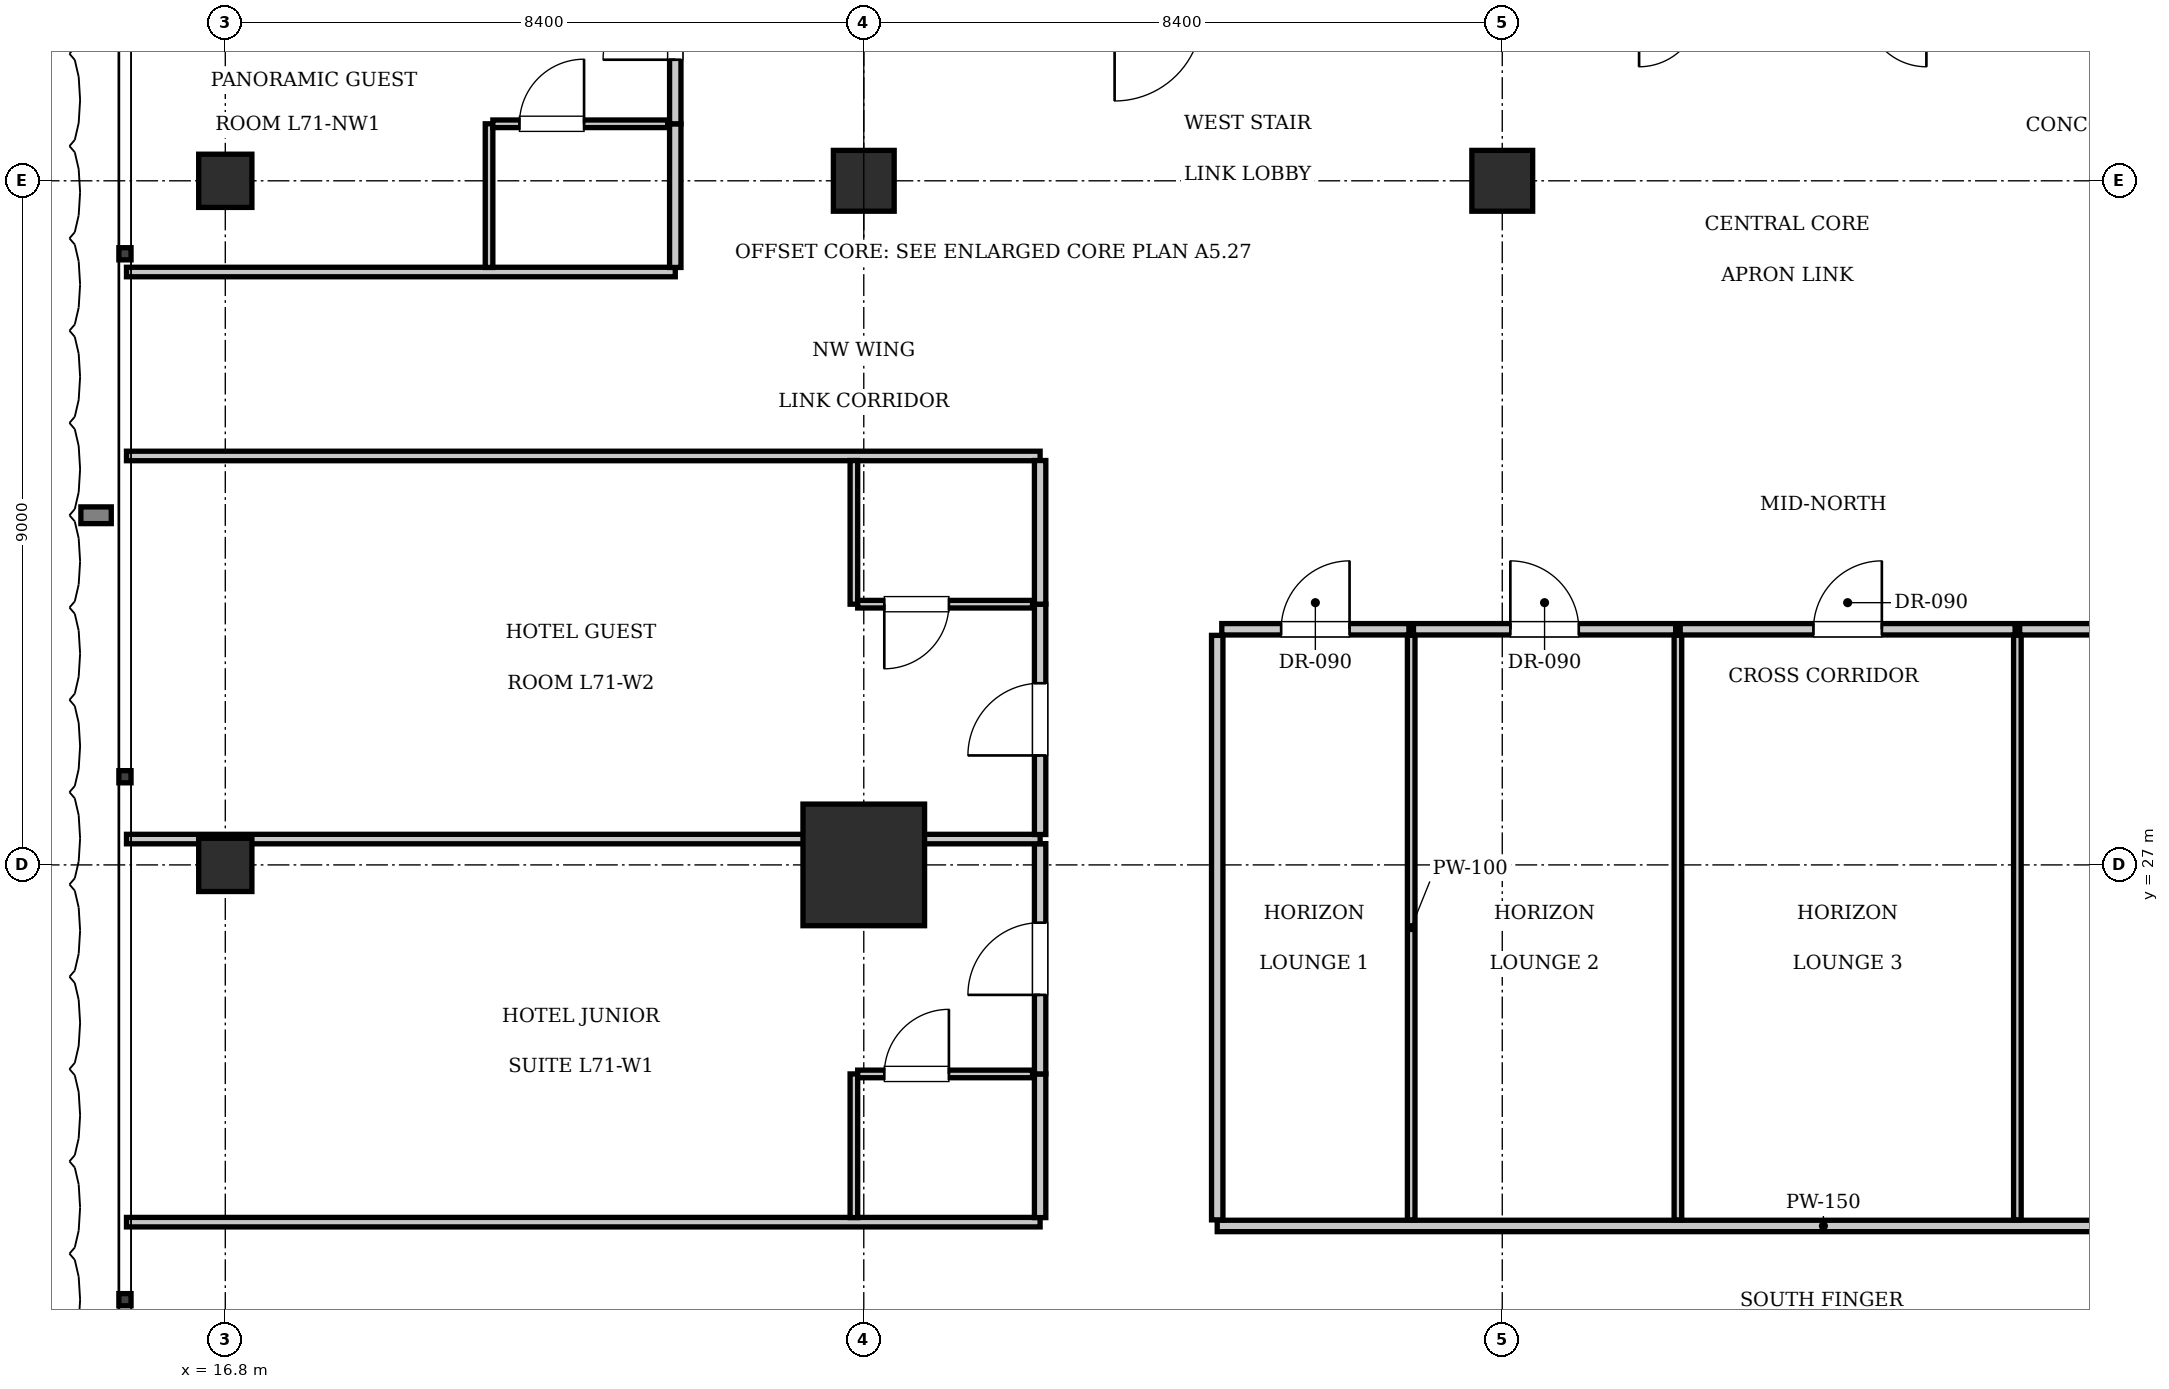
"""IFC4 building model, lengths in metres.
Left out: names, types, materials, properties, quantities, classifications, styles, units other than length and angle.
Written with IfcOpenShell. Run it as: python <this file> out.ifc"""

import sys

from ifc_helpers import new_model, si_unit, direction, frame, frame_2d, origin, origin_2d, place, context, subcontext, project, spatial, rectangle, extrude, element, fill, save


model = new_model("IFC4")
c1 = context("Model", 3, precision=1e-05, world=origin(), true_north=direction((0.0, 1.0)))
c2 = subcontext(c1, "Body", "Model", "MODEL_VIEW")
j1 = project(units=[si_unit("LENGTHUNIT", "METRE"), si_unit("PLANEANGLEUNIT", "RADIAN")], contexts=[c1])
p1 = place(None, origin())
s1 = spatial("IfcSite", under=j1, at=p1, CompositionType="ELEMENT")
p2 = place(p1, origin())
s2 = spatial("IfcBuilding", under=s1, at=p2, CompositionType="ELEMENT")
p3 = place(p2, frame((0.0, 0.0, 289.45)))
s3 = spatial("IfcBuildingStorey", under=s2, at=p3, CompositionType="ELEMENT", Elevation=289.45)
p4 = place(p3, frame((25.2, 27.0, 0.0), z_axis=(0.0, 0.0, 1.0), x_axis=(1.0, 0.0, 0.0)))
e1 = element("IfcColumn", 1, at=p4, inside=s3, PredefinedType="COLUMN", context=c2, shape_type="SweptSolid", body=[
    extrude(rectangle(XDim=1.6, YDim=1.6, at=origin_2d()), origin(), (0.0, 0.0, 1.0), 3.85),
])
for number, where, z_axis, x_axis in (
    (2, (25.2, 36.0, 0.0), (0.0, 0.0, 1.0), (1.0, 0.0, 0.0)),
    (3, (33.6, 36.0, 0.0), (0.0, 0.0, 1.0), (1.0, 0.0, 0.0)),
):
    element("IfcColumn", number, at=place(p3, frame(where, z_axis=z_axis, x_axis=x_axis)), inside=s3, PredefinedType="COLUMN", context=c2, shape_type="SweptSolid", body=[
        extrude(rectangle(XDim=0.8, YDim=0.8, at=origin_2d()), origin(), (0.0, 0.0, 1.0), 3.85),
    ])
for number, where, z_axis, x_axis in (
    (4, (16.8, 27.0, 0.0), (0.0, 0.0, 1.0), (1.0, 0.0, 0.0)),
    (5, (16.8, 36.0, 0.0), (0.0, 0.0, 1.0), (1.0, 0.0, 0.0)),
):
    element("IfcColumn", number, at=place(p3, frame(where, z_axis=z_axis, x_axis=x_axis)), inside=s3, PredefinedType="COLUMN", context=c2, shape_type="SweptSolid", body=[
        extrude(rectangle(XDim=0.7, YDim=0.7, at=origin_2d()), origin(), (0.0, 0.0, 1.0), 3.85),
    ])
p5 = place(p3, frame((29.85, 22.25, 0.0), z_axis=(0.0, 0.0, 1.0), x_axis=(1.0, 0.0, 0.0)))
e6 = element("IfcWall", 6, at=p5, inside=s3, PredefinedType="PARTITIONING", context=c2, shape_type="SweptSolid", body=[
    extrude(rectangle(XDim=15.95, YDim=0.15, at=frame_2d((7.975, 0.0))), origin(), (0.0, 0.0, 1.0), 3.61),
])
p6 = place(p3, frame((29.85, 22.33, 0.0), z_axis=(0.0, 0.0, 1.0), x_axis=(0.0, 1.0, 0.0)))
e7 = element("IfcWall", 7, at=p6, inside=s3, PredefinedType="PARTITIONING", context=c2, shape_type="SweptSolid", body=[
    extrude(rectangle(XDim=7.69, YDim=0.15, at=frame_2d((3.845, 0.0))), origin(), (0.0, 0.0, 1.0), 3.61),
])
p7 = place(p3, frame((29.91, 30.1, 0.0), z_axis=(0.0, 0.0, 1.0), x_axis=(1.0, 0.0, 0.0)))
e8 = element("IfcWall", 8, at=p7, inside=s3, PredefinedType="PARTITIONING", context=c2, shape_type="SweptSolid", body=[
    extrude(rectangle(XDim=2.462, YDim=0.15, at=frame_2d((1.231, 0.0))), origin(), (0.0, 0.0, 1.0), 3.61),
])
p8 = place(p7, frame((0.781, 0.0, 0.0)))
e9 = element("IfcOpeningElement", 9, at=p8, cuts=e8, PredefinedType="OPENING", context=c2, shape_type="SweptSolid", body=[
    extrude(rectangle(XDim=0.9, YDim=2.1, at=frame_2d((0.45, 1.05))), frame((0.0, 0.085, 0.0), z_axis=(0.0, -1.0, 0.0), x_axis=(1.0, 0.0, 0.0)), (0.0, 0.0, 1.0), 0.17),
])
p9 = place(p3, frame((32.402, 22.33, 0.0), z_axis=(0.0, 0.0, 1.0), x_axis=(0.0, 1.0, 0.0)))
e10 = element("IfcWall", 10, at=p9, inside=s3, PredefinedType="PARTITIONING", context=c2, shape_type="SweptSolid", body=[
    extrude(rectangle(XDim=7.69, YDim=0.1, at=frame_2d((3.845, 0.0))), origin(), (0.0, 0.0, 1.0), 3.61),
])
p10 = place(p3, frame((32.432, 30.1, 0.0), z_axis=(0.0, 0.0, 1.0), x_axis=(1.0, 0.0, 0.0)))
e11 = element("IfcWall", 11, at=p10, inside=s3, PredefinedType="PARTITIONING", context=c2, shape_type="SweptSolid", body=[
    extrude(rectangle(XDim=3.449, YDim=0.15, at=frame_2d((1.725, 0.0))), origin(), (0.0, 0.0, 1.0), 3.61),
])
p11 = place(p10, frame((1.274, 0.0, 0.0)))
e12 = element("IfcOpeningElement", 12, at=p11, cuts=e11, PredefinedType="OPENING", context=c2, shape_type="SweptSolid", body=[
    extrude(rectangle(XDim=0.9, YDim=2.1, at=frame_2d((0.45, 1.05))), frame((0.0, 0.085, 0.0), z_axis=(0.0, -1.0, 0.0), x_axis=(1.0, 0.0, 0.0)), (0.0, 0.0, 1.0), 0.17),
])
p12 = place(p3, frame((35.911, 22.33, 0.0), z_axis=(0.0, 0.0, 1.0), x_axis=(0.0, 1.0, 0.0)))
e13 = element("IfcWall", 13, at=p12, inside=s3, PredefinedType="PARTITIONING", context=c2, shape_type="SweptSolid", body=[
    extrude(rectangle(XDim=7.69, YDim=0.1, at=frame_2d((3.845, 0.0))), origin(), (0.0, 0.0, 1.0), 3.61),
])
p13 = place(p3, frame((35.941, 30.1, 0.0), z_axis=(0.0, 0.0, 1.0), x_axis=(1.0, 0.0, 0.0)))
e14 = element("IfcWall", 14, at=p13, inside=s3, PredefinedType="PARTITIONING", context=c2, shape_type="SweptSolid", body=[
    extrude(rectangle(XDim=4.406, YDim=0.15, at=frame_2d((2.203, 0.0))), origin(), (0.0, 0.0, 1.0), 3.61),
])
p14 = place(p13, frame((1.753, 0.0, 0.0)))
e15 = element("IfcOpeningElement", 15, at=p14, cuts=e14, PredefinedType="OPENING", context=c2, shape_type="SweptSolid", body=[
    extrude(rectangle(XDim=0.9, YDim=2.1, at=frame_2d((0.45, 1.05))), frame((0.0, 0.085, 0.0), z_axis=(0.0, -1.0, 0.0), x_axis=(1.0, 0.0, 0.0)), (0.0, 0.0, 1.0), 0.17),
])
p15 = place(p3, frame((40.377, 22.33, 0.0), z_axis=(0.0, 0.0, 1.0), x_axis=(0.0, 1.0, 0.0)))
e16 = element("IfcWall", 16, at=p15, inside=s3, PredefinedType="PARTITIONING", context=c2, shape_type="SweptSolid", body=[
    extrude(rectangle(XDim=7.69, YDim=0.1, at=frame_2d((3.845, 0.0))), origin(), (0.0, 0.0, 1.0), 3.61),
])
p16 = place(p3, frame((40.407, 30.1, 0.0), z_axis=(0.0, 0.0, 1.0), x_axis=(1.0, 0.0, 0.0)))
e17 = element("IfcWall", 17, at=p16, inside=s3, PredefinedType="PARTITIONING", context=c2, shape_type="SweptSolid", body=[
    extrude(rectangle(XDim=5.333, YDim=0.15, at=frame_2d((2.667, 0.0))), origin(), (0.0, 0.0, 1.0), 3.61),
])
p17 = place(p16, frame((2.217, 0.0, 0.0)))
e18 = element("IfcOpeningElement", 18, at=p17, cuts=e17, PredefinedType="OPENING", context=c2, shape_type="SweptSolid", body=[
    extrude(rectangle(XDim=0.9, YDim=2.1, at=frame_2d((0.45, 1.05))), frame((0.0, 0.085, 0.0), z_axis=(0.0, -1.0, 0.0), x_axis=(1.0, 0.0, 0.0)), (0.0, 0.0, 1.0), 0.17),
])
for number, where, z_axis, x_axis in (
    (19, (15.5, 22.3, 0.0), (0.0, 0.0, 1.0), (1.0, 0.0, 0.0)),
    (20, (15.5, 32.38, 0.0), (0.0, 0.0, 1.0), (1.0, 0.0, 0.0)),
):
    element("IfcWall", number, at=place(p3, frame(where, z_axis=z_axis, x_axis=x_axis)), inside=s3, PredefinedType="PARTITIONING", context=c2, shape_type="SweptSolid", body=[
        extrude(rectangle(XDim=12.02, YDim=0.125, at=frame_2d((6.01, 0.0))), origin(), (0.0, 0.0, 1.0), 3.61),
    ])
p18 = place(p3, frame((27.52, 22.36, 0.0), z_axis=(0.0, 0.0, 1.0), x_axis=(0.0, 1.0, 0.0)))
e21 = element("IfcWall", 21, at=p18, inside=s3, PredefinedType="PARTITIONING", context=c2, shape_type="SweptSolid", body=[
    extrude(rectangle(XDim=1.89, YDim=0.15, at=frame_2d((0.945, 0.0))), origin(), (0.0, 0.0, 1.0), 3.61),
])
p19 = place(p3, frame((27.52, 24.25, 0.0), z_axis=(0.0, 0.0, 1.0), x_axis=(0.0, 1.0, 0.0)))
e22 = element("IfcWall", 22, at=p19, inside=s3, PredefinedType="PARTITIONING", context=c2, shape_type="SweptSolid", body=[
    extrude(rectangle(XDim=3.03, YDim=0.15, at=frame_2d((1.515, 0.0))), origin(), (0.0, 0.0, 1.0), 3.61),
])
p20 = place(p19, frame((1.04, 0.0, 0.0)))
e23 = element("IfcOpeningElement", 23, at=p20, cuts=e22, PredefinedType="OPENING", context=c2, shape_type="SweptSolid", body=[
    extrude(rectangle(XDim=0.95, YDim=2.15, at=frame_2d((0.475, 1.075))), frame((0.0, 0.085, 0.0), z_axis=(0.0, -1.0, 0.0), x_axis=(1.0, 0.0, 0.0)), (0.0, 0.0, 1.0), 0.17),
])
p21 = place(p3, frame((25.07, 22.36, 0.0), z_axis=(0.0, 0.0, 1.0), x_axis=(0.0, 1.0, 0.0)))
e24 = element("IfcWall", 24, at=p21, inside=s3, PredefinedType="PARTITIONING", context=c2, shape_type="SweptSolid", body=[
    extrude(rectangle(XDim=1.89, YDim=0.1, at=frame_2d((0.945, 0.0))), origin(), (0.0, 0.0, 1.0), 3.61),
])
p22 = place(p3, frame((25.12, 24.25, 0.0), z_axis=(0.0, 0.0, 1.0), x_axis=(1.0, 0.0, 0.0)))
e25 = element("IfcWall", 25, at=p22, inside=s3, PredefinedType="PARTITIONING", context=c2, shape_type="SweptSolid", body=[
    extrude(rectangle(XDim=2.3, YDim=0.1, at=frame_2d((1.15, 0.0))), origin(), (0.0, 0.0, 1.0), 3.61),
])
p23 = place(p22, frame((0.35, 0.0, 0.0)))
e26 = element("IfcOpeningElement", 26, at=p23, cuts=e25, PredefinedType="OPENING", context=c2, shape_type="SweptSolid", body=[
    extrude(rectangle(XDim=0.85, YDim=2.1, at=frame_2d((0.425, 1.05))), frame((0.0, 0.06, 0.0), z_axis=(0.0, -1.0, 0.0), x_axis=(1.0, 0.0, 0.0)), (0.0, 0.0, 1.0), 0.12),
])
p24 = place(p3, frame((15.5, 27.34, 0.0), z_axis=(0.0, 0.0, 1.0), x_axis=(1.0, 0.0, 0.0)))
e27 = element("IfcWall", 27, at=p24, inside=s3, PredefinedType="PARTITIONING", context=c2, shape_type="SweptSolid", body=[
    extrude(rectangle(XDim=12.02, YDim=0.125, at=frame_2d((6.01, 0.0))), origin(), (0.0, 0.0, 1.0), 3.61),
])
p25 = place(p3, frame((27.52, 27.4, 0.0), z_axis=(0.0, 0.0, 1.0), x_axis=(0.0, 1.0, 0.0)))
e28 = element("IfcWall", 28, at=p25, inside=s3, PredefinedType="PARTITIONING", context=c2, shape_type="SweptSolid", body=[
    extrude(rectangle(XDim=3.03, YDim=0.15, at=frame_2d((1.515, 0.0))), origin(), (0.0, 0.0, 1.0), 3.61),
])
p26 = place(p25, frame((1.04, 0.0, 0.0)))
e29 = element("IfcOpeningElement", 29, at=p26, cuts=e28, PredefinedType="OPENING", context=c2, shape_type="SweptSolid", body=[
    extrude(rectangle(XDim=0.95, YDim=2.15, at=frame_2d((0.475, 1.075))), frame((0.0, 0.085, 0.0), z_axis=(0.0, -1.0, 0.0), x_axis=(1.0, 0.0, 0.0)), (0.0, 0.0, 1.0), 0.17),
])
p27 = place(p3, frame((27.52, 30.43, 0.0), z_axis=(0.0, 0.0, 1.0), x_axis=(0.0, 1.0, 0.0)))
e30 = element("IfcWall", 30, at=p27, inside=s3, PredefinedType="PARTITIONING", context=c2, shape_type="SweptSolid", body=[
    extrude(rectangle(XDim=1.89, YDim=0.15, at=frame_2d((0.945, 0.0))), origin(), (0.0, 0.0, 1.0), 3.61),
])
p28 = place(p3, frame((25.07, 30.43, 0.0), z_axis=(0.0, 0.0, 1.0), x_axis=(0.0, 1.0, 0.0)))
e31 = element("IfcWall", 31, at=p28, inside=s3, PredefinedType="PARTITIONING", context=c2, shape_type="SweptSolid", body=[
    extrude(rectangle(XDim=1.89, YDim=0.1, at=frame_2d((0.945, 0.0))), origin(), (0.0, 0.0, 1.0), 3.61),
])
p29 = place(p3, frame((25.12, 30.43, 0.0), z_axis=(0.0, 0.0, 1.0), x_axis=(1.0, 0.0, 0.0)))
e32 = element("IfcWall", 32, at=p29, inside=s3, PredefinedType="PARTITIONING", context=c2, shape_type="SweptSolid", body=[
    extrude(rectangle(XDim=2.3, YDim=0.1, at=frame_2d((1.15, 0.0))), origin(), (0.0, 0.0, 1.0), 3.61),
])
p30 = place(p29, frame((0.35, 0.0, 0.0)))
e33 = element("IfcOpeningElement", 33, at=p30, cuts=e32, PredefinedType="OPENING", context=c2, shape_type="SweptSolid", body=[
    extrude(rectangle(XDim=0.85, YDim=2.1, at=frame_2d((0.425, 1.05))), frame((0.0, 0.06, 0.0), z_axis=(0.0, -1.0, 0.0), x_axis=(1.0, 0.0, 0.0)), (0.0, 0.0, 1.0), 0.12),
])
p31 = place(p3, frame((15.5, 34.8, 0.0), z_axis=(0.0, 0.0, 1.0), x_axis=(1.0, 0.0, 0.0)))
e34 = element("IfcWall", 34, at=p31, inside=s3, PredefinedType="PARTITIONING", context=c2, shape_type="SweptSolid", body=[
    extrude(rectangle(XDim=7.22, YDim=0.125, at=frame_2d((3.61, 0.0))), origin(), (0.0, 0.0, 1.0), 3.61),
])
p32 = place(p3, frame((22.72, 34.86, 0.0), z_axis=(0.0, 0.0, 1.0), x_axis=(0.0, 1.0, 0.0)))
e35 = element("IfcWall", 35, at=p32, inside=s3, PredefinedType="PARTITIONING", context=c2, shape_type="SweptSolid", body=[
    extrude(rectangle(XDim=1.89, YDim=0.15, at=frame_2d((0.945, 0.0))), origin(), (0.0, 0.0, 1.0), 3.61),
])
p33 = place(p3, frame((22.72, 36.75, 0.0), z_axis=(0.0, 0.0, 1.0), x_axis=(0.0, 1.0, 0.0)))
e36 = element("IfcWall", 36, at=p33, inside=s3, PredefinedType="PARTITIONING", context=c2, shape_type="SweptSolid", body=[
    extrude(rectangle(XDim=2.636, YDim=0.15, at=frame_2d((1.318, 0.0))), origin(), (0.0, 0.0, 1.0), 3.61),
])
p34 = place(p33, frame((0.843, 0.0, 0.0)))
e37 = element("IfcOpeningElement", 37, at=p34, cuts=e36, PredefinedType="OPENING", context=c2, shape_type="SweptSolid", body=[
    extrude(rectangle(XDim=0.95, YDim=2.15, at=frame_2d((0.475, 1.075))), frame((0.0, 0.085, 0.0), z_axis=(0.0, -1.0, 0.0), x_axis=(1.0, 0.0, 0.0)), (0.0, 0.0, 1.0), 0.17),
])
p35 = place(p3, frame((20.27, 34.86, 0.0), z_axis=(0.0, 0.0, 1.0), x_axis=(0.0, 1.0, 0.0)))
e38 = element("IfcWall", 38, at=p35, inside=s3, PredefinedType="PARTITIONING", context=c2, shape_type="SweptSolid", body=[
    extrude(rectangle(XDim=1.89, YDim=0.1, at=frame_2d((0.945, 0.0))), origin(), (0.0, 0.0, 1.0), 3.61),
])
p36 = place(p3, frame((20.32, 36.75, 0.0), z_axis=(0.0, 0.0, 1.0), x_axis=(1.0, 0.0, 0.0)))
e39 = element("IfcWall", 39, at=p36, inside=s3, PredefinedType="PARTITIONING", context=c2, shape_type="SweptSolid", body=[
    extrude(rectangle(XDim=2.3, YDim=0.1, at=frame_2d((1.15, 0.0))), origin(), (0.0, 0.0, 1.0), 3.61),
])
p37 = place(p36, frame((0.35, 0.0, 0.0)))
e40 = element("IfcOpeningElement", 40, at=p37, cuts=e39, PredefinedType="OPENING", context=c2, shape_type="SweptSolid", body=[
    extrude(rectangle(XDim=0.85, YDim=2.1, at=frame_2d((0.425, 1.05))), frame((0.0, 0.06, 0.0), z_axis=(0.0, -1.0, 0.0), x_axis=(1.0, 0.0, 0.0)), (0.0, 0.0, 1.0), 0.12),
])
p38 = place(p8, origin())
e41 = element("IfcDoor", 41, at=p38, inside=s3, OperationType="SINGLE_SWING_RIGHT", PredefinedType="DOOR", context=c2, shape_type="SweptSolid", body=[
    extrude(rectangle(XDim=0.9, YDim=2.1, at=frame_2d((0.45, 1.05))), frame((0.0, 0.025, 0.0), z_axis=(0.0, -1.0, 0.0), x_axis=(1.0, 0.0, 0.0)), (0.0, 0.0, 1.0), 0.05),
])
fill(e9, e41)
p39 = place(p11, origin())
e42 = element("IfcDoor", 42, at=p39, inside=s3, OperationType="SINGLE_SWING_LEFT", PredefinedType="DOOR", context=c2, shape_type="SweptSolid", body=[
    extrude(rectangle(XDim=0.9, YDim=2.1, at=frame_2d((0.45, 1.05))), frame((0.0, 0.025, 0.0), z_axis=(0.0, -1.0, 0.0), x_axis=(1.0, 0.0, 0.0)), (0.0, 0.0, 1.0), 0.05),
])
fill(e12, e42)
p40 = place(p14, origin())
e43 = element("IfcDoor", 43, at=p40, inside=s3, OperationType="SINGLE_SWING_RIGHT", PredefinedType="DOOR", context=c2, shape_type="SweptSolid", body=[
    extrude(rectangle(XDim=0.9, YDim=2.1, at=frame_2d((0.45, 1.05))), frame((0.0, 0.025, 0.0), z_axis=(0.0, -1.0, 0.0), x_axis=(1.0, 0.0, 0.0)), (0.0, 0.0, 1.0), 0.05),
])
fill(e15, e43)
p41 = place(p23, origin())
e44 = element("IfcDoor", 44, at=p41, inside=s3, OperationType="SINGLE_SWING_RIGHT", PredefinedType="DOOR", context=c2, shape_type="SweptSolid", body=[
    extrude(rectangle(XDim=0.85, YDim=2.1, at=frame_2d((0.425, 1.05))), frame((0.0, 0.025, 0.0), z_axis=(0.0, -1.0, 0.0), x_axis=(1.0, 0.0, 0.0)), (0.0, 0.0, 1.0), 0.05),
])
fill(e26, e44)
p42 = place(p20, origin())
e45 = element("IfcDoor", 45, at=p42, inside=s3, OperationType="SINGLE_SWING_LEFT", PredefinedType="DOOR", context=c2, shape_type="SweptSolid", body=[
    extrude(rectangle(XDim=0.95, YDim=2.15, at=frame_2d((0.475, 1.075))), frame((0.0, 0.025, 0.0), z_axis=(0.0, -1.0, 0.0), x_axis=(1.0, 0.0, 0.0)), (0.0, 0.0, 1.0), 0.05),
])
fill(e23, e45)
p43 = place(p30, frame((0.85, 0.0, 0.0), z_axis=(0.0, 0.0, 1.0), x_axis=(-1.0, 0.0, 0.0)))
e46 = element("IfcDoor", 46, at=p43, inside=s3, OperationType="SINGLE_SWING_RIGHT", PredefinedType="DOOR", context=c2, shape_type="SweptSolid", body=[
    extrude(rectangle(XDim=0.85, YDim=2.1, at=frame_2d((0.425, 1.05))), frame((0.0, 0.025, 0.0), z_axis=(0.0, -1.0, 0.0), x_axis=(1.0, 0.0, 0.0)), (0.0, 0.0, 1.0), 0.05),
])
fill(e33, e46)
p44 = place(p26, origin())
e47 = element("IfcDoor", 47, at=p44, inside=s3, OperationType="SINGLE_SWING_LEFT", PredefinedType="DOOR", context=c2, shape_type="SweptSolid", body=[
    extrude(rectangle(XDim=0.95, YDim=2.15, at=frame_2d((0.475, 1.075))), frame((0.0, 0.025, 0.0), z_axis=(0.0, -1.0, 0.0), x_axis=(1.0, 0.0, 0.0)), (0.0, 0.0, 1.0), 0.05),
])
fill(e29, e47)
p45 = place(p37, origin())
e48 = element("IfcDoor", 48, at=p45, inside=s3, OperationType="SINGLE_SWING_RIGHT", PredefinedType="DOOR", context=c2, shape_type="SweptSolid", body=[
    extrude(rectangle(XDim=0.85, YDim=2.1, at=frame_2d((0.425, 1.05))), frame((0.0, 0.025, 0.0), z_axis=(0.0, -1.0, 0.0), x_axis=(1.0, 0.0, 0.0)), (0.0, 0.0, 1.0), 0.05),
])
fill(e40, e48)
p46 = place(p34, origin())
e49 = element("IfcDoor", 49, at=p46, inside=s3, OperationType="SINGLE_SWING_LEFT", PredefinedType="DOOR", context=c2, shape_type="SweptSolid", body=[
    extrude(rectangle(XDim=0.95, YDim=2.15, at=frame_2d((0.475, 1.075))), frame((0.0, 0.025, 0.0), z_axis=(0.0, -1.0, 0.0), x_axis=(1.0, 0.0, 0.0)), (0.0, 0.0, 1.0), 0.05),
])
fill(e37, e49)
save(model, sys.argv[1])
